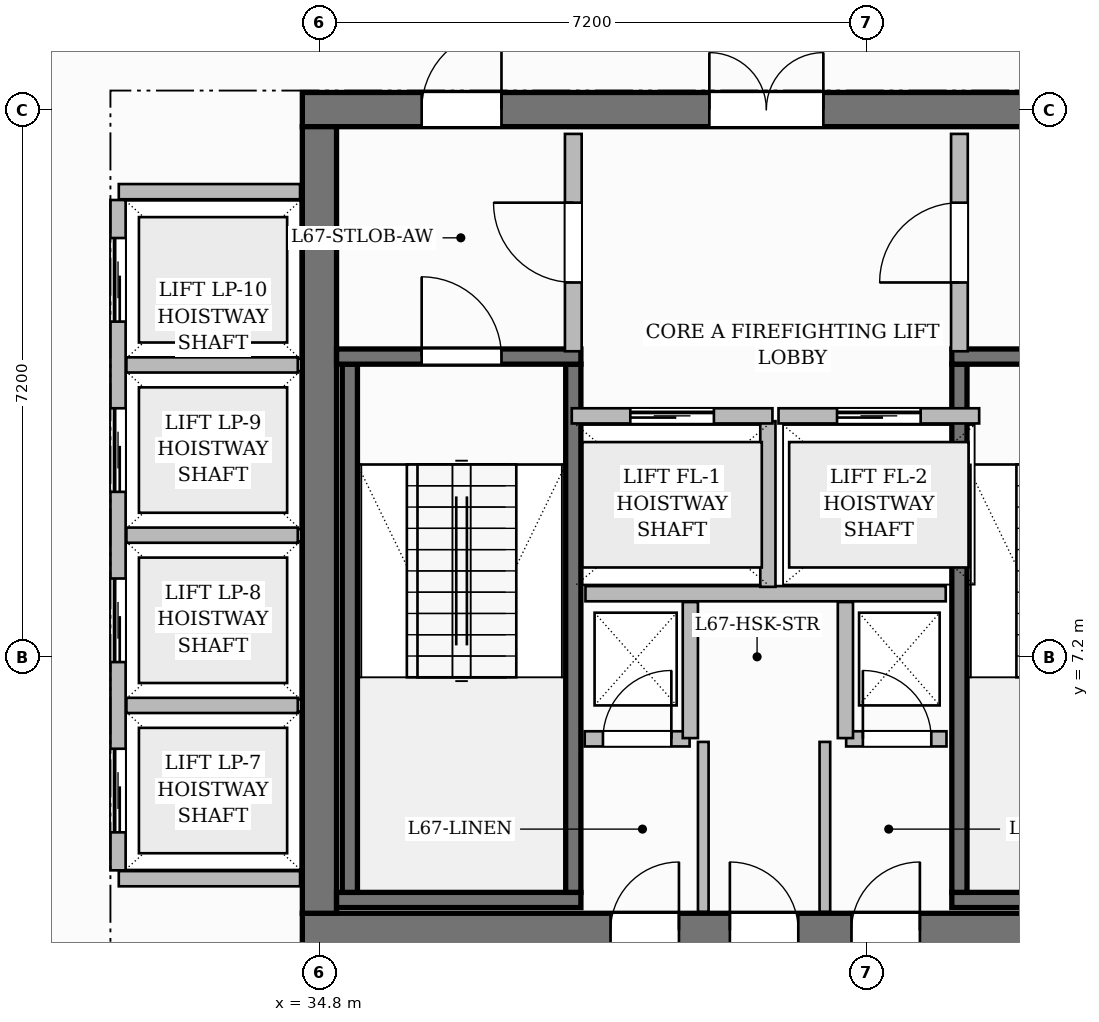
"""IFC4 building model, lengths in metres.
Left out: names, types, materials, properties, quantities, classifications, styles, units other than length and angle.
Written with IfcOpenShell. Run it as: python <this file> out.ifc"""

import sys

from ifc_helpers import new_model, si_unit, direction, frame, frame_2d, origin, place, context, subcontext, project, spatial, rectangle, extrude, source, transform, mapped, element, fill, save


model = new_model("IFC4")
c1 = context("Model", 3, precision=1e-05, world=origin(), true_north=direction((0.0, 1.0)))
c2 = subcontext(c1, "Body", "Model", "MODEL_VIEW")
j1 = project(units=[si_unit("LENGTHUNIT", "METRE"), si_unit("PLANEANGLEUNIT", "RADIAN")], contexts=[c1])
p1 = place(None, origin())
s1 = spatial("IfcSite", under=j1, at=p1, CompositionType="ELEMENT")
p2 = place(p1, origin())
s2 = spatial("IfcBuilding", under=s1, at=p2, CompositionType="ELEMENT")
p3 = place(p2, frame((0.0, 0.0, 267.35)))
s3 = spatial("IfcBuildingStorey", under=s2, at=p3, CompositionType="ELEMENT", Elevation=267.35)
p4 = place(p3, frame((34.575, 3.6, 0.0), z_axis=(0.0, 0.0, 1.0), x_axis=(1.0, 0.0, 0.0)))
e1 = element("IfcWall", 1, at=p4, inside=s3, PredefinedType="SHEAR", context=c2, shape_type="SweptSolid", body=[
    extrude(rectangle(XDim=15.45, YDim=0.45, at=frame_2d((7.725, 0.0))), origin(), (0.0, 0.0, 1.0), 3.85),
])
p5 = place(p4, frame((4.055, 0.0, 0.0)))
e2 = element("IfcOpeningElement", 2, at=p5, cuts=e1, PredefinedType="OPENING", context=c2, shape_type="SweptSolid", body=[
    extrude(rectangle(XDim=0.9, YDim=2.1, at=frame_2d((0.45, 1.05))), frame((0.0, 0.235, 0.0), z_axis=(0.0, -1.0, 0.0), x_axis=(1.0, 0.0, 0.0)), (0.0, 0.0, 1.0), 0.47),
])
p6 = place(p4, frame((5.625, 0.0, 0.0)))
e3 = element("IfcOpeningElement", 3, at=p6, cuts=e1, PredefinedType="OPENING", context=c2, shape_type="SweptSolid", body=[
    extrude(rectangle(XDim=0.9, YDim=2.1, at=frame_2d((0.45, 1.05))), frame((0.0, 0.235, 0.0), z_axis=(0.0, -1.0, 0.0), x_axis=(1.0, 0.0, 0.0)), (0.0, 0.0, 1.0), 0.47),
])
p7 = place(p4, frame((7.225, 0.0, 0.0)))
e4 = element("IfcOpeningElement", 4, at=p7, cuts=e1, PredefinedType="OPENING", context=c2, shape_type="SweptSolid", body=[
    extrude(rectangle(XDim=0.9, YDim=2.1, at=frame_2d((0.45, 1.05))), frame((0.0, 0.235, 0.0), z_axis=(0.0, -1.0, 0.0), x_axis=(1.0, 0.0, 0.0)), (0.0, 0.0, 1.0), 0.47),
])
p8 = place(p3, frame((34.575, 14.4, 0.0), z_axis=(0.0, 0.0, 1.0), x_axis=(1.0, 0.0, 0.0)))
e5 = element("IfcWall", 5, at=p8, inside=s3, PredefinedType="SHEAR", context=c2, shape_type="SweptSolid", body=[
    extrude(rectangle(XDim=15.45, YDim=0.45, at=frame_2d((7.725, 0.0))), origin(), (0.0, 0.0, 1.0), 3.85),
])
p9 = place(p8, frame((5.355, 0.0, 0.0)))
e6 = element("IfcOpeningElement", 6, at=p9, cuts=e5, PredefinedType="OPENING", context=c2, shape_type="SweptSolid", body=[
    extrude(rectangle(XDim=1.5, YDim=2.2, at=frame_2d((0.75, 1.1))), frame((0.0, 0.235, 0.0), z_axis=(0.0, -1.0, 0.0), x_axis=(1.0, 0.0, 0.0)), (0.0, 0.0, 1.0), 0.47),
])
p10 = place(p8, frame((1.57, 0.0, 0.0)))
e7 = element("IfcOpeningElement", 7, at=p10, cuts=e5, PredefinedType="OPENING", context=c2, shape_type="SweptSolid", body=[
    extrude(rectangle(XDim=1.05, YDim=2.15, at=frame_2d((0.525, 1.075))), frame((0.0, 0.235, 0.0), z_axis=(0.0, -1.0, 0.0), x_axis=(1.0, 0.0, 0.0)), (0.0, 0.0, 1.0), 0.47),
])
p11 = place(p8, frame((11.2, 0.0, 0.0)))
e8 = element("IfcOpeningElement", 8, at=p11, cuts=e5, PredefinedType="OPENING", context=c2, shape_type="SweptSolid", body=[
    extrude(rectangle(XDim=1.05, YDim=2.15, at=frame_2d((0.525, 1.075))), frame((0.0, 0.235, 0.0), z_axis=(0.0, -1.0, 0.0), x_axis=(1.0, 0.0, 0.0)), (0.0, 0.0, 1.0), 0.47),
])
p12 = place(p3, frame((34.8, 3.825, 0.0), z_axis=(0.0, 0.0, 1.0), x_axis=(0.0, 1.0, 0.0)))
e9 = element("IfcWall", 9, at=p12, inside=s3, PredefinedType="SHEAR", context=c2, shape_type="SweptSolid", body=[
    extrude(rectangle(XDim=10.35, YDim=0.45, at=frame_2d((5.175, 0.0))), origin(), (0.0, 0.0, 1.0), 3.85),
])
p13 = place(p3, frame((35.025, 4.0, 0.0), z_axis=(0.0, 0.0, 1.0), x_axis=(1.0, 0.0, 0.0)))
e10 = element("IfcWall", 10, at=p13, inside=s3, PredefinedType="SHEAR", context=c2, shape_type="SweptSolid", body=[
    extrude(rectangle(XDim=3.215, YDim=0.2, at=frame_2d((1.607, 0.0))), origin(), (0.0, 0.0, 1.0), 3.85),
])
for number, where, z_axis, x_axis in (
    (11, (35.2, 4.1, 0.0), (0.0, 0.0, 1.0), (0.0, 1.0, 0.0)),
    (12, (38.14, 4.1, 0.0), (0.0, 0.0, 1.0), (0.0, 1.0, 0.0)),
):
    element("IfcWall", number, at=place(p3, frame(where, z_axis=z_axis, x_axis=x_axis)), inside=s3, PredefinedType="SHEAR", context=c2, shape_type="SweptSolid", body=[
        extrude(rectangle(XDim=6.95, YDim=0.2, at=frame_2d((3.475, 0.0))), origin(), (0.0, 0.0, 1.0), 3.85),
    ])
p14 = place(p3, frame((35.025, 11.15, 0.0), z_axis=(0.0, 0.0, 1.0), x_axis=(1.0, 0.0, 0.0)))
e13 = element("IfcWall", 13, at=p14, inside=s3, PredefinedType="SHEAR", context=c2, shape_type="SweptSolid", body=[
    extrude(rectangle(XDim=3.215, YDim=0.2, at=frame_2d((1.607, 0.0))), origin(), (0.0, 0.0, 1.0), 3.85),
])
p15 = place(p14, frame((1.12, 0.0, 0.0)))
e14 = element("IfcOpeningElement", 14, at=p15, cuts=e13, PredefinedType="OPENING", context=c2, shape_type="SweptSolid", body=[
    extrude(rectangle(XDim=1.05, YDim=2.2, at=frame_2d((0.525, 1.1))), frame((0.0, 0.11, 0.0), z_axis=(0.0, -1.0, 0.0), x_axis=(1.0, 0.0, 0.0)), (0.0, 0.0, 1.0), 0.22),
])
p16 = place(p3, frame((43.12, 4.0, 0.0), z_axis=(0.0, 0.0, 1.0), x_axis=(1.0, 0.0, 0.0)))
e15 = element("IfcWall", 15, at=p16, inside=s3, PredefinedType="SHEAR", context=c2, shape_type="SweptSolid", body=[
    extrude(rectangle(XDim=6.455, YDim=0.2, at=frame_2d((3.228, 0.0))), origin(), (0.0, 0.0, 1.0), 3.85),
])
p17 = place(p3, frame((43.22, 4.1, 0.0), z_axis=(0.0, 0.0, 1.0), x_axis=(0.0, 1.0, 0.0)))
e16 = element("IfcWall", 16, at=p17, inside=s3, PredefinedType="SHEAR", context=c2, shape_type="SweptSolid", body=[
    extrude(rectangle(XDim=6.95, YDim=0.2, at=frame_2d((3.475, 0.0))), origin(), (0.0, 0.0, 1.0), 3.85),
])
p18 = place(p3, frame((43.12, 11.15, 0.0), z_axis=(0.0, 0.0, 1.0), x_axis=(1.0, 0.0, 0.0)))
e17 = element("IfcWall", 17, at=p18, inside=s3, PredefinedType="SHEAR", context=c2, shape_type="SweptSolid", body=[
    extrude(rectangle(XDim=6.455, YDim=0.2, at=frame_2d((3.228, 0.0))), origin(), (0.0, 0.0, 1.0), 3.85),
])
p19 = place(p18, frame((1.045, 0.0, 0.0)))
e18 = element("IfcOpeningElement", 18, at=p19, cuts=e17, PredefinedType="OPENING", context=c2, shape_type="SweptSolid", body=[
    extrude(rectangle(XDim=1.05, YDim=2.2, at=frame_2d((0.525, 1.1))), frame((0.0, 0.11, 0.0), z_axis=(0.0, -1.0, 0.0), x_axis=(1.0, 0.0, 0.0)), (0.0, 0.0, 1.0), 0.22),
])
p20 = place(p18, frame((4.125, 0.0, 0.0)))
e19 = element("IfcOpeningElement", 19, at=p20, cuts=e17, PredefinedType="OPENING", context=c2, shape_type="SweptSolid", body=[
    extrude(rectangle(XDim=1.05, YDim=2.2, at=frame_2d((0.525, 1.1))), frame((0.0, 0.11, 0.0), z_axis=(0.0, -1.0, 0.0), x_axis=(1.0, 0.0, 0.0)), (0.0, 0.0, 1.0), 0.22),
])
p21 = place(p3, frame((38.3, 8.03, 0.0), z_axis=(0.0, 0.0, 1.0), x_axis=(1.0, 0.0, 0.0)))
e20 = element("IfcWall", 20, at=p21, inside=s3, PredefinedType="PARTITIONING", context=c2, shape_type="SweptSolid", body=[
    extrude(rectangle(XDim=4.74, YDim=0.2, at=frame_2d((2.37, 0.0))), origin(), (0.0, 0.0, 1.0), 3.6),
])
p22 = place(p3, frame((40.7, 8.12, 0.0), z_axis=(0.0, 0.0, 1.0), x_axis=(0.0, 1.0, 0.0)))
e21 = element("IfcWall", 21, at=p22, inside=s3, PredefinedType="PARTITIONING", context=c2, shape_type="SweptSolid", body=[
    extrude(rectangle(XDim=2.18, YDim=0.2, at=frame_2d((1.09, 0.0))), origin(), (0.0, 0.0, 1.0), 3.6),
])
p23 = place(p3, frame((38.14, 11.22, 0.0), z_axis=(0.0, 0.0, 1.0), x_axis=(0.0, 1.0, 0.0)))
e22 = element("IfcWall", 22, at=p23, inside=s3, PredefinedType="PARTITIONING", context=c2, shape_type="SweptSolid", body=[
    extrude(rectangle(XDim=2.86, YDim=0.22, at=frame_2d((1.43, 0.0))), origin(), (0.0, 0.0, 1.0), 3.6),
])
p24 = place(p23, frame((0.905, 0.0, 0.0)))
e23 = element("IfcOpeningElement", 23, at=p24, cuts=e22, PredefinedType="OPENING", context=c2, shape_type="SweptSolid", body=[
    extrude(rectangle(XDim=1.05, YDim=2.15, at=frame_2d((0.525, 1.075))), frame((0.0, 0.12, 0.0), z_axis=(0.0, -1.0, 0.0), x_axis=(1.0, 0.0, 0.0)), (0.0, 0.0, 1.0), 0.24),
])
p25 = place(p3, frame((43.22, 11.22, 0.0), z_axis=(0.0, 0.0, 1.0), x_axis=(0.0, 1.0, 0.0)))
e24 = element("IfcWall", 24, at=p25, inside=s3, PredefinedType="PARTITIONING", context=c2, shape_type="SweptSolid", body=[
    extrude(rectangle(XDim=2.86, YDim=0.22, at=frame_2d((1.43, 0.0))), origin(), (0.0, 0.0, 1.0), 3.6),
])
p26 = place(p25, frame((0.905, 0.0, 0.0)))
e25 = element("IfcOpeningElement", 25, at=p26, cuts=e24, PredefinedType="OPENING", context=c2, shape_type="SweptSolid", body=[
    extrude(rectangle(XDim=1.05, YDim=2.15, at=frame_2d((0.525, 1.075))), frame((0.0, 0.12, 0.0), z_axis=(0.0, -1.0, 0.0), x_axis=(1.0, 0.0, 0.0)), (0.0, 0.0, 1.0), 0.24),
])
p27 = place(p3, frame((38.29, 6.12, 0.0), z_axis=(0.0, 0.0, 1.0), x_axis=(1.0, 0.0, 0.0)))
e26 = element("IfcWall", 26, at=p27, inside=s3, PredefinedType="PARTITIONING", context=c2, shape_type="SweptSolid", body=[
    extrude(rectangle(XDim=1.38, YDim=0.2, at=frame_2d((0.69, 0.0))), origin(), (0.0, 0.0, 1.0), 3.6),
])
p28 = place(p27, frame((0.24, 0.0, 0.0)))
e27 = element("IfcOpeningElement", 27, at=p28, cuts=e26, PredefinedType="OPENING", context=c2, shape_type="SweptSolid", body=[
    extrude(rectangle(XDim=0.9, YDim=2.1, at=frame_2d((0.45, 1.05))), frame((0.0, 0.11, 0.0), z_axis=(0.0, -1.0, 0.0), x_axis=(1.0, 0.0, 0.0)), (0.0, 0.0, 1.0), 0.22),
])
p29 = place(p3, frame((39.68, 6.13, 0.0), z_axis=(0.0, 0.0, 1.0), x_axis=(0.0, 1.0, 0.0)))
e28 = element("IfcWall", 28, at=p29, inside=s3, PredefinedType="PARTITIONING", context=c2, shape_type="SweptSolid", body=[
    extrude(rectangle(XDim=1.79, YDim=0.2, at=frame_2d((0.895, 0.0))), origin(), (0.0, 0.0, 1.0), 3.6),
])
p30 = place(p3, frame((41.73, 6.12, 0.0), z_axis=(0.0, 0.0, 1.0), x_axis=(1.0, 0.0, 0.0)))
e29 = element("IfcWall", 29, at=p30, inside=s3, PredefinedType="PARTITIONING", context=c2, shape_type="SweptSolid", body=[
    extrude(rectangle(XDim=1.32, YDim=0.2, at=frame_2d((0.66, 0.0))), origin(), (0.0, 0.0, 1.0), 3.6),
])
p31 = place(p30, frame((0.22, 0.0, 0.0)))
e30 = element("IfcOpeningElement", 30, at=p31, cuts=e29, PredefinedType="OPENING", context=c2, shape_type="SweptSolid", body=[
    extrude(rectangle(XDim=0.9, YDim=2.1, at=frame_2d((0.45, 1.05))), frame((0.0, 0.11, 0.0), z_axis=(0.0, -1.0, 0.0), x_axis=(1.0, 0.0, 0.0)), (0.0, 0.0, 1.0), 0.22),
])
p32 = place(p3, frame((41.72, 6.13, 0.0), z_axis=(0.0, 0.0, 1.0), x_axis=(0.0, 1.0, 0.0)))
e31 = element("IfcWall", 31, at=p32, inside=s3, PredefinedType="PARTITIONING", context=c2, shape_type="SweptSolid", body=[
    extrude(rectangle(XDim=1.79, YDim=0.2, at=frame_2d((0.895, 0.0))), origin(), (0.0, 0.0, 1.0), 3.6),
])
for number, where, z_axis, x_axis in (
    (32, (39.85, 3.845, 0.0), (0.0, 0.0, 1.0), (0.0, 1.0, 0.0)),
    (33, (41.45, 3.845, 0.0), (0.0, 0.0, 1.0), (0.0, 1.0, 0.0)),
):
    element("IfcWall", number, at=place(p3, frame(where, z_axis=z_axis, x_axis=x_axis)), inside=s3, PredefinedType="PARTITIONING", context=c2, shape_type="SweptSolid", body=[
        extrude(rectangle(XDim=2.235, YDim=0.14, at=frame_2d((1.118, 0.0))), origin(), (0.0, 0.0, 1.0), 3.6),
    ])
for number, where, z_axis, x_axis in (
    (34, (32.16, 4.28, 0.0), (0.0, 0.0, 1.0), (1.0, 0.0, 0.0)),
    (35, (32.16, 13.32, 0.0), (0.0, 0.0, 1.0), (1.0, 0.0, 0.0)),
):
    element("IfcWall", number, at=place(p3, frame(where, z_axis=z_axis, x_axis=x_axis)), inside=s3, PredefinedType="PARTITIONING", context=c2, shape_type="SweptSolid", body=[
        extrude(rectangle(XDim=2.385, YDim=0.2, at=frame_2d((1.192, 0.0))), origin(), (0.0, 0.0, 1.0), 3.6),
    ])
p33 = place(p3, frame((32.15, 4.39, 0.0), z_axis=(0.0, 0.0, 1.0), x_axis=(0.0, 1.0, 0.0)))
e36 = element("IfcWall", 36, at=p33, inside=s3, PredefinedType="PARTITIONING", context=c2, shape_type="SweptSolid", body=[
    extrude(rectangle(XDim=8.82, YDim=0.2, at=frame_2d((4.41, 0.0))), origin(), (0.0, 0.0, 1.0), 3.6),
])
p34 = place(p33, frame((0.5, 0.0, 0.0)))
e37 = element("IfcOpeningElement", 37, at=p34, cuts=e36, PredefinedType="OPENING", context=c2, shape_type="SweptSolid", body=[
    extrude(rectangle(XDim=1.1, YDim=2.2, at=frame_2d((0.55, 1.1))), frame((0.0, 0.11, 0.0), z_axis=(0.0, -1.0, 0.0), x_axis=(1.0, 0.0, 0.0)), (0.0, 0.0, 1.0), 0.22),
])
p35 = place(p33, frame((2.74, 0.0, 0.0)))
e38 = element("IfcOpeningElement", 38, at=p35, cuts=e36, PredefinedType="OPENING", context=c2, shape_type="SweptSolid", body=[
    extrude(rectangle(XDim=1.1, YDim=2.2, at=frame_2d((0.55, 1.1))), frame((0.0, 0.11, 0.0), z_axis=(0.0, -1.0, 0.0), x_axis=(1.0, 0.0, 0.0)), (0.0, 0.0, 1.0), 0.22),
])
p36 = place(p33, frame((4.98, 0.0, 0.0)))
e39 = element("IfcOpeningElement", 39, at=p36, cuts=e36, PredefinedType="OPENING", context=c2, shape_type="SweptSolid", body=[
    extrude(rectangle(XDim=1.1, YDim=2.2, at=frame_2d((0.55, 1.1))), frame((0.0, 0.11, 0.0), z_axis=(0.0, -1.0, 0.0), x_axis=(1.0, 0.0, 0.0)), (0.0, 0.0, 1.0), 0.22),
])
p37 = place(p33, frame((7.22, 0.0, 0.0)))
e40 = element("IfcOpeningElement", 40, at=p37, cuts=e36, PredefinedType="OPENING", context=c2, shape_type="SweptSolid", body=[
    extrude(rectangle(XDim=1.1, YDim=2.2, at=frame_2d((0.55, 1.1))), frame((0.0, 0.11, 0.0), z_axis=(0.0, -1.0, 0.0), x_axis=(1.0, 0.0, 0.0)), (0.0, 0.0, 1.0), 0.22),
])
for number, where, z_axis, x_axis in (
    (41, (32.26, 6.56, 0.0), (0.0, 0.0, 1.0), (1.0, 0.0, 0.0)),
    (42, (32.26, 8.8, 0.0), (0.0, 0.0, 1.0), (1.0, 0.0, 0.0)),
    (43, (32.26, 11.04, 0.0), (0.0, 0.0, 1.0), (1.0, 0.0, 0.0)),
):
    element("IfcWall", number, at=place(p3, frame(where, z_axis=z_axis, x_axis=x_axis)), inside=s3, PredefinedType="PARTITIONING", context=c2, shape_type="SweptSolid", body=[
        extrude(rectangle(XDim=2.255, YDim=0.2, at=frame_2d((1.127, 0.0))), origin(), (0.0, 0.0, 1.0), 3.6),
    ])
p38 = place(p3, frame((38.12, 10.37, 0.0), z_axis=(0.0, 0.0, 1.0), x_axis=(1.0, 0.0, 0.0)))
e44 = element("IfcWall", 44, at=p38, inside=s3, PredefinedType="PARTITIONING", context=c2, shape_type="SweptSolid", body=[
    extrude(rectangle(XDim=2.64, YDim=0.2, at=frame_2d((1.32, 0.0))), origin(), (0.0, 0.0, 1.0), 3.6),
])
p39 = place(p38, frame((0.77, 0.0, 0.0)))
e45 = element("IfcOpeningElement", 45, at=p39, cuts=e44, PredefinedType="OPENING", context=c2, shape_type="SweptSolid", body=[
    extrude(rectangle(XDim=1.1, YDim=2.2, at=frame_2d((0.55, 1.1))), frame((0.0, 0.11, 0.0), z_axis=(0.0, -1.0, 0.0), x_axis=(1.0, 0.0, 0.0)), (0.0, 0.0, 1.0), 0.22),
])
p40 = place(p3, frame((40.84, 10.37, 0.0), z_axis=(0.0, 0.0, 1.0), x_axis=(1.0, 0.0, 0.0)))
e46 = element("IfcWall", 46, at=p40, inside=s3, PredefinedType="PARTITIONING", context=c2, shape_type="SweptSolid", body=[
    extrude(rectangle(XDim=2.64, YDim=0.2, at=frame_2d((1.32, 0.0))), origin(), (0.0, 0.0, 1.0), 3.6),
])
p41 = place(p40, frame((0.77, 0.0, 0.0)))
e47 = element("IfcOpeningElement", 47, at=p41, cuts=e46, PredefinedType="OPENING", context=c2, shape_type="SweptSolid", body=[
    extrude(rectangle(XDim=1.1, YDim=2.2, at=frame_2d((0.55, 1.1))), frame((0.0, 0.11, 0.0), z_axis=(0.0, -1.0, 0.0), x_axis=(1.0, 0.0, 0.0)), (0.0, 0.0, 1.0), 0.22),
])
m1 = source(origin(), c2, "Body", "SweptSolid", [
    extrude(rectangle(XDim=1.05, YDim=2.2, at=frame_2d((0.525, 1.1))), frame((0.0, 0.025, 0.0), z_axis=(0.0, -1.0, 0.0), x_axis=(1.0, 0.0, 0.0)), (0.0, 0.0, 1.0), 0.05),
])
p42 = place(p15, origin())
e48 = element("IfcDoor", 48, at=p42, inside=s3, OperationType="SINGLE_SWING_LEFT", PredefinedType="DOOR", context=c2, shape_type="MappedRepresentation", body=[
    mapped(m1, transform((0.0, 0.0, 0.0), scale=1.0)),
])
fill(e14, e48)
m2 = source(origin(), c2, "Body", "SweptSolid", [
    extrude(rectangle(XDim=1.05, YDim=2.15, at=frame_2d((0.525, 1.075))), frame((0.0, 0.025, 0.0), z_axis=(0.0, -1.0, 0.0), x_axis=(1.0, 0.0, 0.0)), (0.0, 0.0, 1.0), 0.05),
])
p43 = place(p24, origin())
e49 = element("IfcDoor", 49, at=p43, inside=s3, OperationType="SINGLE_SWING_RIGHT", PredefinedType="DOOR", context=c2, shape_type="MappedRepresentation", body=[
    mapped(m2, transform((0.0, 0.0, 0.0), scale=1.0)),
])
fill(e23, e49)
p44 = place(p26, origin())
e50 = element("IfcDoor", 50, at=p44, inside=s3, OperationType="SINGLE_SWING_LEFT", PredefinedType="DOOR", context=c2, shape_type="MappedRepresentation", body=[
    mapped(m2, transform((0.0, 0.0, 0.0), scale=1.0)),
])
fill(e25, e50)
m3 = source(origin(), c2, "Body", "SweptSolid", [
    extrude(rectangle(XDim=1.5, YDim=2.2, at=frame_2d((0.75, 1.1))), frame((0.0, 0.025, 0.0), z_axis=(0.0, -1.0, 0.0), x_axis=(1.0, 0.0, 0.0)), (0.0, 0.0, 1.0), 0.05),
])
p45 = place(p9, origin())
e51 = element("IfcDoor", 51, at=p45, inside=s3, OperationType="DOUBLE_DOOR_SINGLE_SWING", PredefinedType="DOOR", context=c2, shape_type="MappedRepresentation", body=[
    mapped(m3, transform((0.0, 0.0, 0.0), scale=1.0)),
])
fill(e6, e51)
p46 = place(p10, origin())
e52 = element("IfcDoor", 52, at=p46, inside=s3, OperationType="SINGLE_SWING_RIGHT", PredefinedType="DOOR", context=c2, shape_type="MappedRepresentation", body=[
    mapped(m2, transform((0.0, 0.0, 0.0), scale=1.0)),
])
fill(e7, e52)
m4 = source(origin(), c2, "Body", "SweptSolid", [
    extrude(rectangle(XDim=0.9, YDim=2.1, at=frame_2d((0.45, 1.05))), frame((0.0, 0.025, 0.0), z_axis=(0.0, -1.0, 0.0), x_axis=(1.0, 0.0, 0.0)), (0.0, 0.0, 1.0), 0.05),
])
p47 = place(p28, origin())
e53 = element("IfcDoor", 53, at=p47, inside=s3, OperationType="SINGLE_SWING_RIGHT", PredefinedType="DOOR", context=c2, shape_type="MappedRepresentation", body=[
    mapped(m4, transform((0.0, 0.0, 0.0), scale=1.0)),
])
fill(e27, e53)
p48 = place(p31, origin())
e54 = element("IfcDoor", 54, at=p48, inside=s3, OperationType="SINGLE_SWING_LEFT", PredefinedType="DOOR", context=c2, shape_type="MappedRepresentation", body=[
    mapped(m4, transform((0.0, 0.0, 0.0), scale=1.0)),
])
fill(e30, e54)
p49 = place(p5, origin())
e55 = element("IfcDoor", 55, at=p49, inside=s3, OperationType="SINGLE_SWING_RIGHT", PredefinedType="DOOR", context=c2, shape_type="MappedRepresentation", body=[
    mapped(m4, transform((0.0, 0.0, 0.0), scale=1.0)),
])
fill(e2, e55)
p50 = place(p6, origin())
e56 = element("IfcDoor", 56, at=p50, inside=s3, OperationType="SINGLE_SWING_LEFT", PredefinedType="DOOR", context=c2, shape_type="MappedRepresentation", body=[
    mapped(m4, transform((0.0, 0.0, 0.0), scale=1.0)),
])
fill(e3, e56)
p51 = place(p7, origin())
e57 = element("IfcDoor", 57, at=p51, inside=s3, OperationType="SINGLE_SWING_RIGHT", PredefinedType="DOOR", context=c2, shape_type="MappedRepresentation", body=[
    mapped(m4, transform((0.0, 0.0, 0.0), scale=1.0)),
])
fill(e4, e57)
m5 = source(origin(), c2, "Body", "SweptSolid", [
    extrude(rectangle(XDim=1.1, YDim=2.2, at=frame_2d((0.55, 1.1))), frame((0.0, 0.025, 0.0), z_axis=(0.0, -1.0, 0.0), x_axis=(1.0, 0.0, 0.0)), (0.0, 0.0, 1.0), 0.05),
])
p52 = place(p39, origin())
e58 = element("IfcDoor", 58, at=p52, inside=s3, OperationType="SLIDING_TO_LEFT", PredefinedType="DOOR", context=c2, shape_type="MappedRepresentation", body=[
    mapped(m5, transform((0.0, 0.0, 0.0), scale=1.0)),
])
fill(e45, e58)
p53 = place(p41, origin())
e59 = element("IfcDoor", 59, at=p53, inside=s3, OperationType="SLIDING_TO_LEFT", PredefinedType="DOOR", context=c2, shape_type="MappedRepresentation", body=[
    mapped(m5, transform((0.0, 0.0, 0.0), scale=1.0)),
])
fill(e47, e59)
p54 = place(p34, origin())
e60 = element("IfcDoor", 60, at=p54, inside=s3, OperationType="SLIDING_TO_LEFT", PredefinedType="DOOR", context=c2, shape_type="MappedRepresentation", body=[
    mapped(m5, transform((0.0, 0.0, 0.0), scale=1.0)),
])
fill(e37, e60)
p55 = place(p35, origin())
e61 = element("IfcDoor", 61, at=p55, inside=s3, OperationType="SLIDING_TO_LEFT", PredefinedType="DOOR", context=c2, shape_type="MappedRepresentation", body=[
    mapped(m5, transform((0.0, 0.0, 0.0), scale=1.0)),
])
fill(e38, e61)
p56 = place(p36, origin())
e62 = element("IfcDoor", 62, at=p56, inside=s3, OperationType="SLIDING_TO_LEFT", PredefinedType="DOOR", context=c2, shape_type="MappedRepresentation", body=[
    mapped(m5, transform((0.0, 0.0, 0.0), scale=1.0)),
])
fill(e39, e62)
p57 = place(p37, origin())
e63 = element("IfcDoor", 63, at=p57, inside=s3, OperationType="SLIDING_TO_LEFT", PredefinedType="DOOR", context=c2, shape_type="MappedRepresentation", body=[
    mapped(m5, transform((0.0, 0.0, 0.0), scale=1.0)),
])
fill(e40, e63)
save(model, sys.argv[1])
